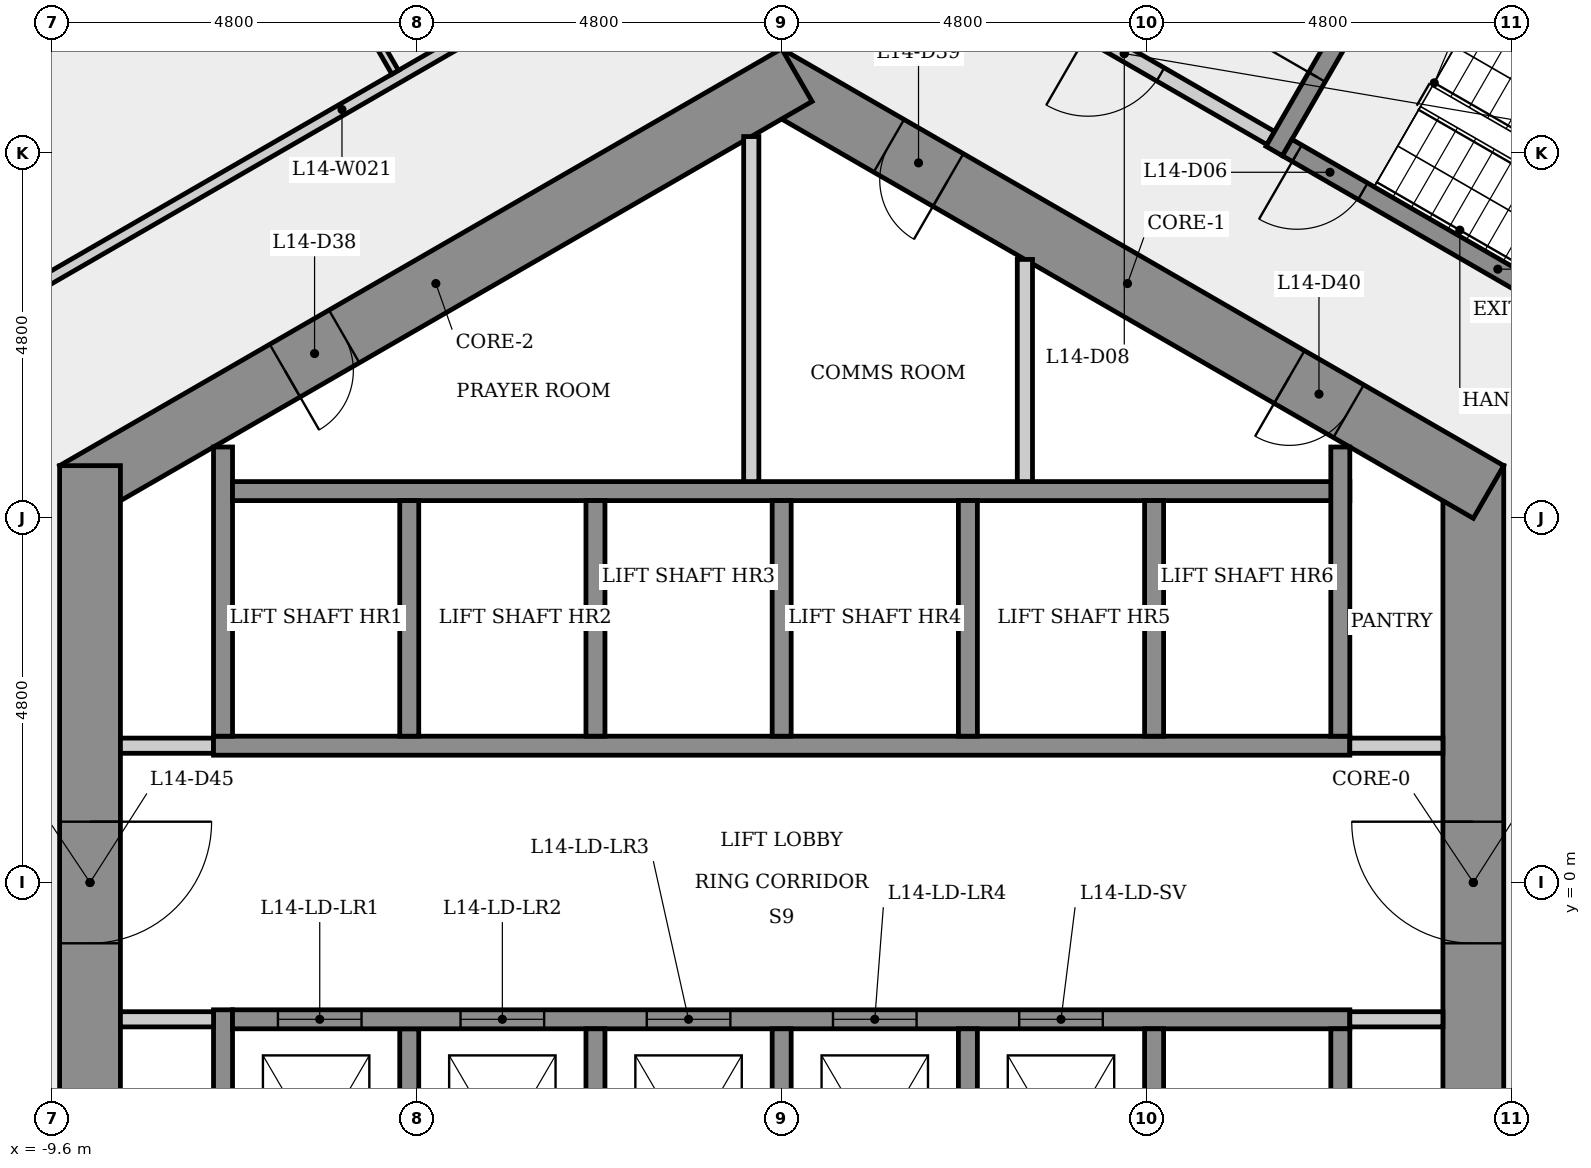
"""IFC4 building model, lengths in metres.
Left out: names, types, materials, properties, quantities, classifications, styles, units other than length and angle.
Written with IfcOpenShell. Run it as: python <this file> out.ifc"""

import sys

from ifc_helpers import new_model, si_unit, direction, frame, frame_2d, origin, place, context, subcontext, project, spatial, rectangle, extrude, element, fill, save


model = new_model("IFC4")
c1 = context("Model", 3, precision=1e-05, world=origin(), true_north=direction((0.0, 1.0)))
c2 = subcontext(c1, "Body", "Model", "MODEL_VIEW")
j1 = project(units=[si_unit("LENGTHUNIT", "METRE"), si_unit("PLANEANGLEUNIT", "RADIAN")], contexts=[c1])
p1 = place(None, origin())
s1 = spatial("IfcSite", under=j1, at=p1, CompositionType="ELEMENT")
p2 = place(p1, origin())
s2 = spatial("IfcBuilding", under=s1, at=p2, CompositionType="ELEMENT")
p3 = place(p2, frame((0.0, 0.0, 56.1)))
s3 = spatial("IfcBuildingStorey", under=s2, at=p3, CompositionType="ELEMENT", Elevation=56.1)
p4 = place(p3, frame((9.1, -5.485, 0.0), z_axis=(0.0, 0.0, 1.0), x_axis=(0.0, 1.0, 0.0)))
e1 = element("IfcWall", 1, at=p4, inside=s3, PredefinedType="SHEAR", context=c2, shape_type="SweptSolid", body=[
    extrude(rectangle(XDim=10.97, YDim=0.8, at=frame_2d((5.485, 0.0))), origin(), (0.0, 0.0, 1.0), 3.4),
])
p5 = place(p4, frame((4.685, 0.0, 0.0)))
e2 = element("IfcOpeningElement", 2, at=p5, cuts=e1, PredefinedType="OPENING", context=c2, shape_type="SweptSolid", body=[
    extrude(rectangle(XDim=1.6, YDim=2.1, at=frame_2d((0.8, 1.05))), frame((0.0, 0.41, 0.0), z_axis=(0.0, -1.0, 0.0), x_axis=(1.0, 0.0, 0.0)), (0.0, 0.0, 1.0), 0.82),
])
p6 = place(p3, frame((9.3, 5.138, 0.0), z_axis=(0.0, 0.0, 1.0), x_axis=(-0.866023993627, 0.500002442456, 0.0)))
e3 = element("IfcWall", 3, at=p6, inside=s3, PredefinedType="SHEAR", context=c2, shape_type="SweptSolid", body=[
    extrude(rectangle(XDim=10.97, YDim=0.8, at=frame_2d((5.485, 0.0))), origin(), (0.0, 0.0, 1.0), 3.4),
])
p7 = place(p6, frame((8.21, 0.0, 0.0)))
e4 = element("IfcOpeningElement", 4, at=p7, cuts=e3, PredefinedType="OPENING", context=c2, shape_type="SweptSolid", body=[
    extrude(rectangle(XDim=0.9, YDim=2.1, at=frame_2d((0.45, 1.05))), frame((0.0, 0.41, 0.0), z_axis=(0.0, -1.0, 0.0), x_axis=(1.0, 0.0, 0.0)), (0.0, 0.0, 1.0), 0.82),
])
p8 = place(p6, frame((2.126, 0.0, 0.0)))
e5 = element("IfcOpeningElement", 5, at=p8, cuts=e3, PredefinedType="OPENING", context=c2, shape_type="SweptSolid", body=[
    extrude(rectangle(XDim=0.9, YDim=2.1, at=frame_2d((0.45, 1.05))), frame((0.0, 0.41, 0.0), z_axis=(0.0, -1.0, 0.0), x_axis=(1.0, 0.0, 0.0)), (0.0, 0.0, 1.0), 0.82),
])
p9 = place(p3, frame((0.2, 10.623, 0.0), z_axis=(0.0, 0.0, 1.0), x_axis=(-0.866023993627, -0.500002442456, 0.0)))
e6 = element("IfcWall", 6, at=p9, inside=s3, PredefinedType="SHEAR", context=c2, shape_type="SweptSolid", body=[
    extrude(rectangle(XDim=10.97, YDim=0.8, at=frame_2d((5.485, 0.0))), origin(), (0.0, 0.0, 1.0), 3.4),
])
p10 = place(p9, frame((6.877, 0.0, 0.0)))
e7 = element("IfcOpeningElement", 7, at=p10, cuts=e6, PredefinedType="OPENING", context=c2, shape_type="SweptSolid", body=[
    extrude(rectangle(XDim=0.9, YDim=2.1, at=frame_2d((0.45, 1.05))), frame((0.0, 0.41, 0.0), z_axis=(0.0, -1.0, 0.0), x_axis=(1.0, 0.0, 0.0)), (0.0, 0.0, 1.0), 0.82),
])
p11 = place(p3, frame((-9.1, 5.485, 0.0), z_axis=(0.0, 0.0, 1.0), x_axis=(0.0, -1.0, 0.0)))
e8 = element("IfcWall", 8, at=p11, inside=s3, PredefinedType="SHEAR", context=c2, shape_type="SweptSolid", body=[
    extrude(rectangle(XDim=10.97, YDim=0.8, at=frame_2d((5.485, 0.0))), origin(), (0.0, 0.0, 1.0), 3.4),
])
p12 = place(p11, frame((4.685, 0.0, 0.0)))
e9 = element("IfcOpeningElement", 9, at=p12, cuts=e8, PredefinedType="OPENING", context=c2, shape_type="SweptSolid", body=[
    extrude(rectangle(XDim=1.6, YDim=2.1, at=frame_2d((0.8, 1.05))), frame((0.0, 0.41, 0.0), z_axis=(0.0, -1.0, 0.0), x_axis=(1.0, 0.0, 0.0)), (0.0, 0.0, 1.0), 0.82),
])
p13 = place(p3, frame((-10.8, 7.275, 0.0), z_axis=(0.0, 0.0, 1.0), x_axis=(0.866027969706, 0.499995555667, 0.0)))
e10 = element("IfcWall", 10, at=p13, inside=s3, PredefinedType="PARTITIONING", context=c2, shape_type="SweptSolid", body=[
    extrude(rectangle(XDim=11.582, YDim=0.15, at=frame_2d((5.791, 0.0))), origin(), (0.0, 0.0, 1.0), 3.05),
])
p14 = place(p13, frame((8.589, 0.0, 0.0)))
e11 = element("IfcOpeningElement", 11, at=p14, cuts=e10, PredefinedType="OPENING", context=c2, shape_type="SweptSolid", body=[
    extrude(rectangle(XDim=1.0, YDim=2.1, at=frame_2d((0.5, 1.05))), frame((0.0, 0.085, 0.0), z_axis=(0.0, -1.0, 0.0), x_axis=(1.0, 0.0, 0.0)), (0.0, 0.0, 1.0), 0.17),
])
p15 = place(p3, frame((-8.7, 1.8, 0.0), z_axis=(0.0, 0.0, 1.0), x_axis=(1.0, 0.0, 0.0)))
e12 = element("IfcWall", 12, at=p15, inside=s3, PredefinedType="PARTITIONING", context=c2, shape_type="SweptSolid", body=[
    extrude(rectangle(XDim=1.225, YDim=0.2, at=frame_2d((0.613, 0.0))), origin(), (0.0, 0.0, 1.0), 3.05),
])
p16 = place(p3, frame((-7.475, 1.8, 0.0), z_axis=(0.0, 0.0, 1.0), x_axis=(1.0, 0.0, 0.0)))
e13 = element("IfcWall", 13, at=p16, inside=s3, PredefinedType="SHEAR", context=c2, shape_type="SweptSolid", body=[
    extrude(rectangle(XDim=14.95, YDim=0.25, at=frame_2d((7.475, 0.0))), origin(), (0.0, 0.0, 1.0), 3.05),
])
p17 = place(p3, frame((-7.35, -5.73, 0.0), z_axis=(0.0, 0.0, 1.0), x_axis=(0.0, 1.0, 0.0)))
e14 = element("IfcWall", 14, at=p17, inside=s3, PredefinedType="SHEAR", context=c2, shape_type="SweptSolid", body=[
    extrude(rectangle(XDim=4.055, YDim=0.25, at=frame_2d((2.028, 0.0))), origin(), (0.0, 0.0, 1.0), 3.05),
])
p18 = place(p3, frame((-7.35, 1.925, 0.0), z_axis=(0.0, 0.0, 1.0), x_axis=(0.0, 1.0, 0.0)))
e15 = element("IfcWall", 15, at=p18, inside=s3, PredefinedType="SHEAR", context=c2, shape_type="SweptSolid", body=[
    extrude(rectangle(XDim=3.805, YDim=0.25, at=frame_2d((1.903, 0.0))), origin(), (0.0, 0.0, 1.0), 3.05),
])
p19 = place(p3, frame((-7.225, 5.15, 0.0), z_axis=(0.0, 0.0, 1.0), x_axis=(1.0, 0.0, 0.0)))
e16 = element("IfcWall", 16, at=p19, inside=s3, PredefinedType="SHEAR", context=c2, shape_type="SweptSolid", body=[
    extrude(rectangle(XDim=14.7, YDim=0.25, at=frame_2d((7.35, 0.0))), origin(), (0.0, 0.0, 1.0), 3.05),
])
p20 = place(p3, frame((-7.475, -1.8, 0.0), z_axis=(0.0, 0.0, 1.0), x_axis=(-1.0, 0.0, 0.0)))
e17 = element("IfcWall", 17, at=p20, inside=s3, PredefinedType="PARTITIONING", context=c2, shape_type="SweptSolid", body=[
    extrude(rectangle(XDim=1.225, YDim=0.2, at=frame_2d((0.613, 0.0))), origin(), (0.0, 0.0, 1.0), 3.05),
])
p21 = place(p3, frame((-5.085, 10.661, 0.0), z_axis=(0.0, 0.0, 1.0), x_axis=(-0.49998793222, 0.866032371008, 0.0)))
e18 = element("IfcWall", 18, at=p21, inside=s3, PredefinedType="PARTITIONING", context=c2, shape_type="SweptSolid", body=[
    extrude(rectangle(XDim=9.606, YDim=0.1, at=frame_2d((4.803, 0.0))), origin(), (0.0, 0.0, 1.0), 3.05),
])
for number, where, z_axis, x_axis in (
    (19, (-4.9, -1.925, 0.0), (0.0, 0.0, 1.0), (0.0, -1.0, 0.0)),
    (20, (-4.9, 5.025, 0.0), (0.0, 0.0, 1.0), (0.0, -1.0, 0.0)),
):
    element("IfcWall", number, at=place(p3, frame(where, z_axis=z_axis, x_axis=x_axis)), inside=s3, PredefinedType="SHEAR", context=c2, shape_type="SweptSolid", body=[
        extrude(rectangle(XDim=3.1, YDim=0.25, at=frame_2d((1.55, 0.0))), origin(), (0.0, 0.0, 1.0), 3.4),
    ])
p22 = place(p3, frame((-7.225, -1.8, 0.0), z_axis=(0.0, 0.0, 1.0), x_axis=(1.0, 0.0, 0.0)))
e21 = element("IfcWall", 21, at=p22, inside=s3, PredefinedType="SHEAR", context=c2, shape_type="SweptSolid", body=[
    extrude(rectangle(XDim=14.7, YDim=0.25, at=frame_2d((7.35, 0.0))), origin(), (0.0, 0.0, 1.0), 3.05),
])
p23 = place(p22, frame((0.597, 0.0, 0.0)))
e22 = element("IfcOpeningElement", 22, at=p23, cuts=e21, PredefinedType="OPENING", context=c2, shape_type="SweptSolid", body=[
    extrude(rectangle(XDim=1.1, YDim=2.1, at=frame_2d((0.55, 1.05))), frame((0.0, 0.135, 0.0), z_axis=(0.0, -1.0, 0.0), x_axis=(1.0, 0.0, 0.0)), (0.0, 0.0, 1.0), 0.27),
])
p24 = place(p22, frame((3.0, 0.0, 0.0)))
e23 = element("IfcOpeningElement", 23, at=p24, cuts=e21, PredefinedType="OPENING", context=c2, shape_type="SweptSolid", body=[
    extrude(rectangle(XDim=1.1, YDim=2.1, at=frame_2d((0.55, 1.05))), frame((0.0, 0.135, 0.0), z_axis=(0.0, -1.0, 0.0), x_axis=(1.0, 0.0, 0.0)), (0.0, 0.0, 1.0), 0.27),
])
p25 = place(p22, frame((5.45, 0.0, 0.0)))
e24 = element("IfcOpeningElement", 24, at=p25, cuts=e21, PredefinedType="OPENING", context=c2, shape_type="SweptSolid", body=[
    extrude(rectangle(XDim=1.1, YDim=2.1, at=frame_2d((0.55, 1.05))), frame((0.0, 0.135, 0.0), z_axis=(0.0, -1.0, 0.0), x_axis=(1.0, 0.0, 0.0)), (0.0, 0.0, 1.0), 0.27),
])
p26 = place(p22, frame((7.9, 0.0, 0.0)))
e25 = element("IfcOpeningElement", 25, at=p26, cuts=e21, PredefinedType="OPENING", context=c2, shape_type="SweptSolid", body=[
    extrude(rectangle(XDim=1.1, YDim=2.1, at=frame_2d((0.55, 1.05))), frame((0.0, 0.135, 0.0), z_axis=(0.0, -1.0, 0.0), x_axis=(1.0, 0.0, 0.0)), (0.0, 0.0, 1.0), 0.27),
])
p27 = place(p22, frame((10.35, 0.0, 0.0)))
e26 = element("IfcOpeningElement", 26, at=p27, cuts=e21, PredefinedType="OPENING", context=c2, shape_type="SweptSolid", body=[
    extrude(rectangle(XDim=1.1, YDim=2.1, at=frame_2d((0.55, 1.05))), frame((0.0, 0.135, 0.0), z_axis=(0.0, -1.0, 0.0), x_axis=(1.0, 0.0, 0.0)), (0.0, 0.0, 1.0), 0.27),
])
for number, where, z_axis, x_axis in (
    (27, (-2.45, -1.925, 0.0), (0.0, 0.0, 1.0), (0.0, -1.0, 0.0)),
    (28, (-2.45, 5.025, 0.0), (0.0, 0.0, 1.0), (0.0, -1.0, 0.0)),
):
    element("IfcWall", number, at=place(p3, frame(where, z_axis=z_axis, x_axis=x_axis)), inside=s3, PredefinedType="SHEAR", context=c2, shape_type="SweptSolid", body=[
        extrude(rectangle(XDim=3.1, YDim=0.25, at=frame_2d((1.55, 0.0))), origin(), (0.0, 0.0, 1.0), 3.4),
    ])
p28 = place(p3, frame((-0.4, 9.815, 0.0), z_axis=(0.0, 0.0, 1.0), x_axis=(0.0, -1.0, 0.0)))
e29 = element("IfcWall", 29, at=p28, inside=s3, PredefinedType="PARTITIONING", context=c2, shape_type="SweptSolid", body=[
    extrude(rectangle(XDim=4.54, YDim=0.2, at=frame_2d((2.27, 0.0))), origin(), (0.0, 0.0, 1.0), 3.05),
])
for number, where, z_axis, x_axis in (
    (30, (0.0, -1.925, 0.0), (0.0, 0.0, 1.0), (0.0, -1.0, 0.0)),
    (31, (0.0, 5.025, 0.0), (0.0, 0.0, 1.0), (0.0, -1.0, 0.0)),
    (32, (2.45, -1.925, 0.0), (0.0, 0.0, 1.0), (0.0, -1.0, 0.0)),
    (33, (2.45, 5.025, 0.0), (0.0, 0.0, 1.0), (0.0, -1.0, 0.0)),
):
    element("IfcWall", number, at=place(p3, frame(where, z_axis=z_axis, x_axis=x_axis)), inside=s3, PredefinedType="SHEAR", context=c2, shape_type="SweptSolid", body=[
        extrude(rectangle(XDim=3.1, YDim=0.25, at=frame_2d((1.55, 0.0))), origin(), (0.0, 0.0, 1.0), 3.4),
    ])
p29 = place(p3, frame((3.2, 8.198, 0.0), z_axis=(0.0, 0.0, 1.0), x_axis=(0.0, -1.0, 0.0)))
e34 = element("IfcWall", 34, at=p29, inside=s3, PredefinedType="PARTITIONING", context=c2, shape_type="SweptSolid", body=[
    extrude(rectangle(XDim=2.924, YDim=0.2, at=frame_2d((1.462, 0.0))), origin(), (0.0, 0.0, 1.0), 3.05),
])
for number, where, z_axis, x_axis in (
    (35, (4.9, -1.925, 0.0), (0.0, 0.0, 1.0), (0.0, -1.0, 0.0)),
    (36, (4.9, 5.025, 0.0), (0.0, 0.0, 1.0), (0.0, -1.0, 0.0)),
):
    element("IfcWall", number, at=place(p3, frame(where, z_axis=z_axis, x_axis=x_axis)), inside=s3, PredefinedType="SHEAR", context=c2, shape_type="SweptSolid", body=[
        extrude(rectangle(XDim=3.1, YDim=0.25, at=frame_2d((1.55, 0.0))), origin(), (0.0, 0.0, 1.0), 3.4),
    ])
p30 = place(p3, frame((6.435, 9.795, 0.0), z_axis=(0.0, 0.0, 1.0), x_axis=(-0.866012907634, 0.500021643343, 0.0)))
e37 = element("IfcWall", 37, at=p30, inside=s3, PredefinedType="PARTITIONING", context=c2, shape_type="SweptSolid", body=[
    extrude(rectangle(XDim=4.45, YDim=0.2, at=frame_2d((2.225, 0.0))), origin(), (0.0, 0.0, 1.0), 3.05),
])
p31 = place(p30, frame((1.675, 0.0, 0.0)))
e38 = element("IfcOpeningElement", 38, at=p31, cuts=e37, PredefinedType="OPENING", context=c2, shape_type="SweptSolid", body=[
    extrude(rectangle(XDim=1.1, YDim=2.1, at=frame_2d((0.55, 1.05))), frame((0.0, 0.11, 0.0), z_axis=(0.0, -1.0, 0.0), x_axis=(1.0, 0.0, 0.0)), (0.0, 0.0, 1.0), 0.22),
])
p32 = place(p3, frame((6.48, 9.624, 0.0), z_axis=(0.0, 0.0, 1.0), x_axis=(0.500017246033, 0.866015446554, 0.0)))
e39 = element("IfcWall", 39, at=p32, inside=s3, PredefinedType="SHEAR", context=c2, shape_type="SweptSolid", body=[
    extrude(rectangle(XDim=3.25, YDim=0.25, at=frame_2d((1.625, 0.0))), origin(), (0.0, 0.0, 1.0), 3.05),
])
p33 = place(p32, frame((1.125, 0.0, 0.0)))
e40 = element("IfcOpeningElement", 40, at=p33, cuts=e39, PredefinedType="OPENING", context=c2, shape_type="SweptSolid", body=[
    extrude(rectangle(XDim=1.0, YDim=2.1, at=frame_2d((0.5, 1.05))), frame((0.0, 0.135, 0.0), z_axis=(0.0, -1.0, 0.0), x_axis=(1.0, 0.0, 0.0)), (0.0, 0.0, 1.0), 0.27),
])
p34 = place(p3, frame((7.475, 1.8, 0.0), z_axis=(0.0, 0.0, 1.0), x_axis=(1.0, 0.0, 0.0)))
e41 = element("IfcWall", 41, at=p34, inside=s3, PredefinedType="PARTITIONING", context=c2, shape_type="SweptSolid", body=[
    extrude(rectangle(XDim=1.225, YDim=0.2, at=frame_2d((0.613, 0.0))), origin(), (0.0, 0.0, 1.0), 3.05),
])
for number, where, z_axis, x_axis in (
    (42, (7.35, -1.925, 0.0), (0.0, 0.0, 1.0), (0.0, -1.0, 0.0)),
    (43, (7.35, 5.73, 0.0), (0.0, 0.0, 1.0), (0.0, -1.0, 0.0)),
):
    element("IfcWall", number, at=place(p3, frame(where, z_axis=z_axis, x_axis=x_axis)), inside=s3, PredefinedType="SHEAR", context=c2, shape_type="SweptSolid", body=[
        extrude(rectangle(XDim=3.805, YDim=0.25, at=frame_2d((1.903, 0.0))), origin(), (0.0, 0.0, 1.0), 3.05),
    ])
p35 = place(p3, frame((8.151, 12.268, 0.0), z_axis=(0.0, 0.0, 1.0), x_axis=(0.866025499775, -0.499999833739, 0.0)))
e44 = element("IfcWall", 44, at=p35, inside=s3, PredefinedType="SHEAR", context=c2, shape_type="SweptSolid", body=[
    extrude(rectangle(XDim=6.4, YDim=0.25, at=frame_2d((3.2, 0.0))), origin(), (0.0, 0.0, 1.0), 3.05),
])
p36 = place(p3, frame((8.7, -1.8, 0.0), z_axis=(0.0, 0.0, 1.0), x_axis=(-1.0, 0.0, 0.0)))
e45 = element("IfcWall", 45, at=p36, inside=s3, PredefinedType="PARTITIONING", context=c2, shape_type="SweptSolid", body=[
    extrude(rectangle(XDim=1.225, YDim=0.2, at=frame_2d((0.613, 0.0))), origin(), (0.0, 0.0, 1.0), 3.05),
])
p37 = place(p3, frame((12.194, 6.47, 0.0), z_axis=(0.0, 0.0, 1.0), x_axis=(-0.866025499775, 0.499999833739, 0.0)))
e46 = element("IfcWall", 46, at=p37, inside=s3, PredefinedType="SHEAR", context=c2, shape_type="SweptSolid", body=[
    extrude(rectangle(XDim=6.4, YDim=0.25, at=frame_2d((3.2, 0.0))), origin(), (0.0, 0.0, 1.0), 3.05),
])
p38 = place(p37, frame((5.25, 0.0, 0.0)))
e47 = element("IfcOpeningElement", 47, at=p38, cuts=e46, PredefinedType="OPENING", context=c2, shape_type="SweptSolid", body=[
    extrude(rectangle(XDim=1.0, YDim=2.1, at=frame_2d((0.5, 1.05))), frame((0.0, 0.135, 0.0), z_axis=(0.0, -1.0, 0.0), x_axis=(1.0, 0.0, 0.0)), (0.0, 0.0, 1.0), 0.27),
])
p39 = place(p23, origin())
e48 = element("IfcDoor", 48, at=p39, inside=s3, OperationType="SLIDING_TO_LEFT", PredefinedType="DOOR", context=c2, shape_type="SweptSolid", body=[
    extrude(rectangle(XDim=1.1, YDim=2.1, at=frame_2d((0.55, 1.05))), frame((0.0, 0.025, 0.0), z_axis=(0.0, -1.0, 0.0), x_axis=(1.0, 0.0, 0.0)), (0.0, 0.0, 1.0), 0.05),
])
fill(e22, e48)
p40 = place(p24, origin())
e49 = element("IfcDoor", 49, at=p40, inside=s3, OperationType="SLIDING_TO_LEFT", PredefinedType="DOOR", context=c2, shape_type="SweptSolid", body=[
    extrude(rectangle(XDim=1.1, YDim=2.1, at=frame_2d((0.55, 1.05))), frame((0.0, 0.025, 0.0), z_axis=(0.0, -1.0, 0.0), x_axis=(1.0, 0.0, 0.0)), (0.0, 0.0, 1.0), 0.05),
])
fill(e23, e49)
p41 = place(p25, origin())
e50 = element("IfcDoor", 50, at=p41, inside=s3, OperationType="SLIDING_TO_LEFT", PredefinedType="DOOR", context=c2, shape_type="SweptSolid", body=[
    extrude(rectangle(XDim=1.1, YDim=2.1, at=frame_2d((0.55, 1.05))), frame((0.0, 0.025, 0.0), z_axis=(0.0, -1.0, 0.0), x_axis=(1.0, 0.0, 0.0)), (0.0, 0.0, 1.0), 0.05),
])
fill(e24, e50)
p42 = place(p26, origin())
e51 = element("IfcDoor", 51, at=p42, inside=s3, OperationType="SLIDING_TO_LEFT", PredefinedType="DOOR", context=c2, shape_type="SweptSolid", body=[
    extrude(rectangle(XDim=1.1, YDim=2.1, at=frame_2d((0.55, 1.05))), frame((0.0, 0.025, 0.0), z_axis=(0.0, -1.0, 0.0), x_axis=(1.0, 0.0, 0.0)), (0.0, 0.0, 1.0), 0.05),
])
fill(e25, e51)
p43 = place(p27, origin())
e52 = element("IfcDoor", 52, at=p43, inside=s3, OperationType="SLIDING_TO_LEFT", PredefinedType="DOOR", context=c2, shape_type="SweptSolid", body=[
    extrude(rectangle(XDim=1.1, YDim=2.1, at=frame_2d((0.55, 1.05))), frame((0.0, 0.025, 0.0), z_axis=(0.0, -1.0, 0.0), x_axis=(1.0, 0.0, 0.0)), (0.0, 0.0, 1.0), 0.05),
])
fill(e26, e52)
p44 = place(p38, origin())
e53 = element("IfcDoor", 53, at=p44, inside=s3, OperationType="SINGLE_SWING_RIGHT", PredefinedType="DOOR", context=c2, shape_type="SweptSolid", body=[
    extrude(rectangle(XDim=1.0, YDim=2.1, at=frame_2d((0.5, 1.05))), frame((0.0, 0.025, 0.0), z_axis=(0.0, -1.0, 0.0), x_axis=(1.0, 0.0, 0.0)), (0.0, 0.0, 1.0), 0.05),
])
fill(e47, e53)
p45 = place(p33, origin())
e54 = element("IfcDoor", 54, at=p45, inside=s3, OperationType="SINGLE_SWING_LEFT", PredefinedType="DOOR", context=c2, shape_type="SweptSolid", body=[
    extrude(rectangle(XDim=1.0, YDim=2.1, at=frame_2d((0.5, 1.05))), frame((0.0, 0.025, 0.0), z_axis=(0.0, -1.0, 0.0), x_axis=(1.0, 0.0, 0.0)), (0.0, 0.0, 1.0), 0.05),
])
fill(e40, e54)
p46 = place(p31, origin())
e55 = element("IfcDoor", 55, at=p46, inside=s3, OperationType="SINGLE_SWING_RIGHT", PredefinedType="DOOR", context=c2, shape_type="SweptSolid", body=[
    extrude(rectangle(XDim=1.1, YDim=2.1, at=frame_2d((0.55, 1.05))), frame((0.0, 0.025, 0.0), z_axis=(0.0, -1.0, 0.0), x_axis=(1.0, 0.0, 0.0)), (0.0, 0.0, 1.0), 0.05),
])
fill(e38, e55)
p47 = place(p10, origin())
e56 = element("IfcDoor", 56, at=p47, inside=s3, OperationType="SINGLE_SWING_RIGHT", PredefinedType="DOOR", context=c2, shape_type="SweptSolid", body=[
    extrude(rectangle(XDim=0.9, YDim=2.1, at=frame_2d((0.45, 1.05))), frame((0.0, 0.025, 0.0), z_axis=(0.0, -1.0, 0.0), x_axis=(1.0, 0.0, 0.0)), (0.0, 0.0, 1.0), 0.05),
])
fill(e7, e56)
p48 = place(p7, origin())
e57 = element("IfcDoor", 57, at=p48, inside=s3, OperationType="SINGLE_SWING_LEFT", PredefinedType="DOOR", context=c2, shape_type="SweptSolid", body=[
    extrude(rectangle(XDim=0.9, YDim=2.1, at=frame_2d((0.45, 1.05))), frame((0.0, 0.025, 0.0), z_axis=(0.0, -1.0, 0.0), x_axis=(1.0, 0.0, 0.0)), (0.0, 0.0, 1.0), 0.05),
])
fill(e4, e57)
p49 = place(p8, origin())
e58 = element("IfcDoor", 58, at=p49, inside=s3, OperationType="SINGLE_SWING_RIGHT", PredefinedType="DOOR", context=c2, shape_type="SweptSolid", body=[
    extrude(rectangle(XDim=0.9, YDim=2.1, at=frame_2d((0.45, 1.05))), frame((0.0, 0.025, 0.0), z_axis=(0.0, -1.0, 0.0), x_axis=(1.0, 0.0, 0.0)), (0.0, 0.0, 1.0), 0.05),
])
fill(e5, e58)
p50 = place(p5, origin())
e59 = element("IfcDoor", 59, at=p50, inside=s3, OperationType="SINGLE_SWING_RIGHT", PredefinedType="DOOR", context=c2, shape_type="SweptSolid", body=[
    extrude(rectangle(XDim=1.6, YDim=2.1, at=frame_2d((0.8, 1.05))), frame((0.0, 0.025, 0.0), z_axis=(0.0, -1.0, 0.0), x_axis=(1.0, 0.0, 0.0)), (0.0, 0.0, 1.0), 0.05),
])
fill(e2, e59)
p51 = place(p12, origin())
e60 = element("IfcDoor", 60, at=p51, inside=s3, OperationType="SINGLE_SWING_LEFT", PredefinedType="DOOR", context=c2, shape_type="SweptSolid", body=[
    extrude(rectangle(XDim=1.6, YDim=2.1, at=frame_2d((0.8, 1.05))), frame((0.0, 0.025, 0.0), z_axis=(0.0, -1.0, 0.0), x_axis=(1.0, 0.0, 0.0)), (0.0, 0.0, 1.0), 0.05),
])
fill(e9, e60)
save(model, sys.argv[1])
